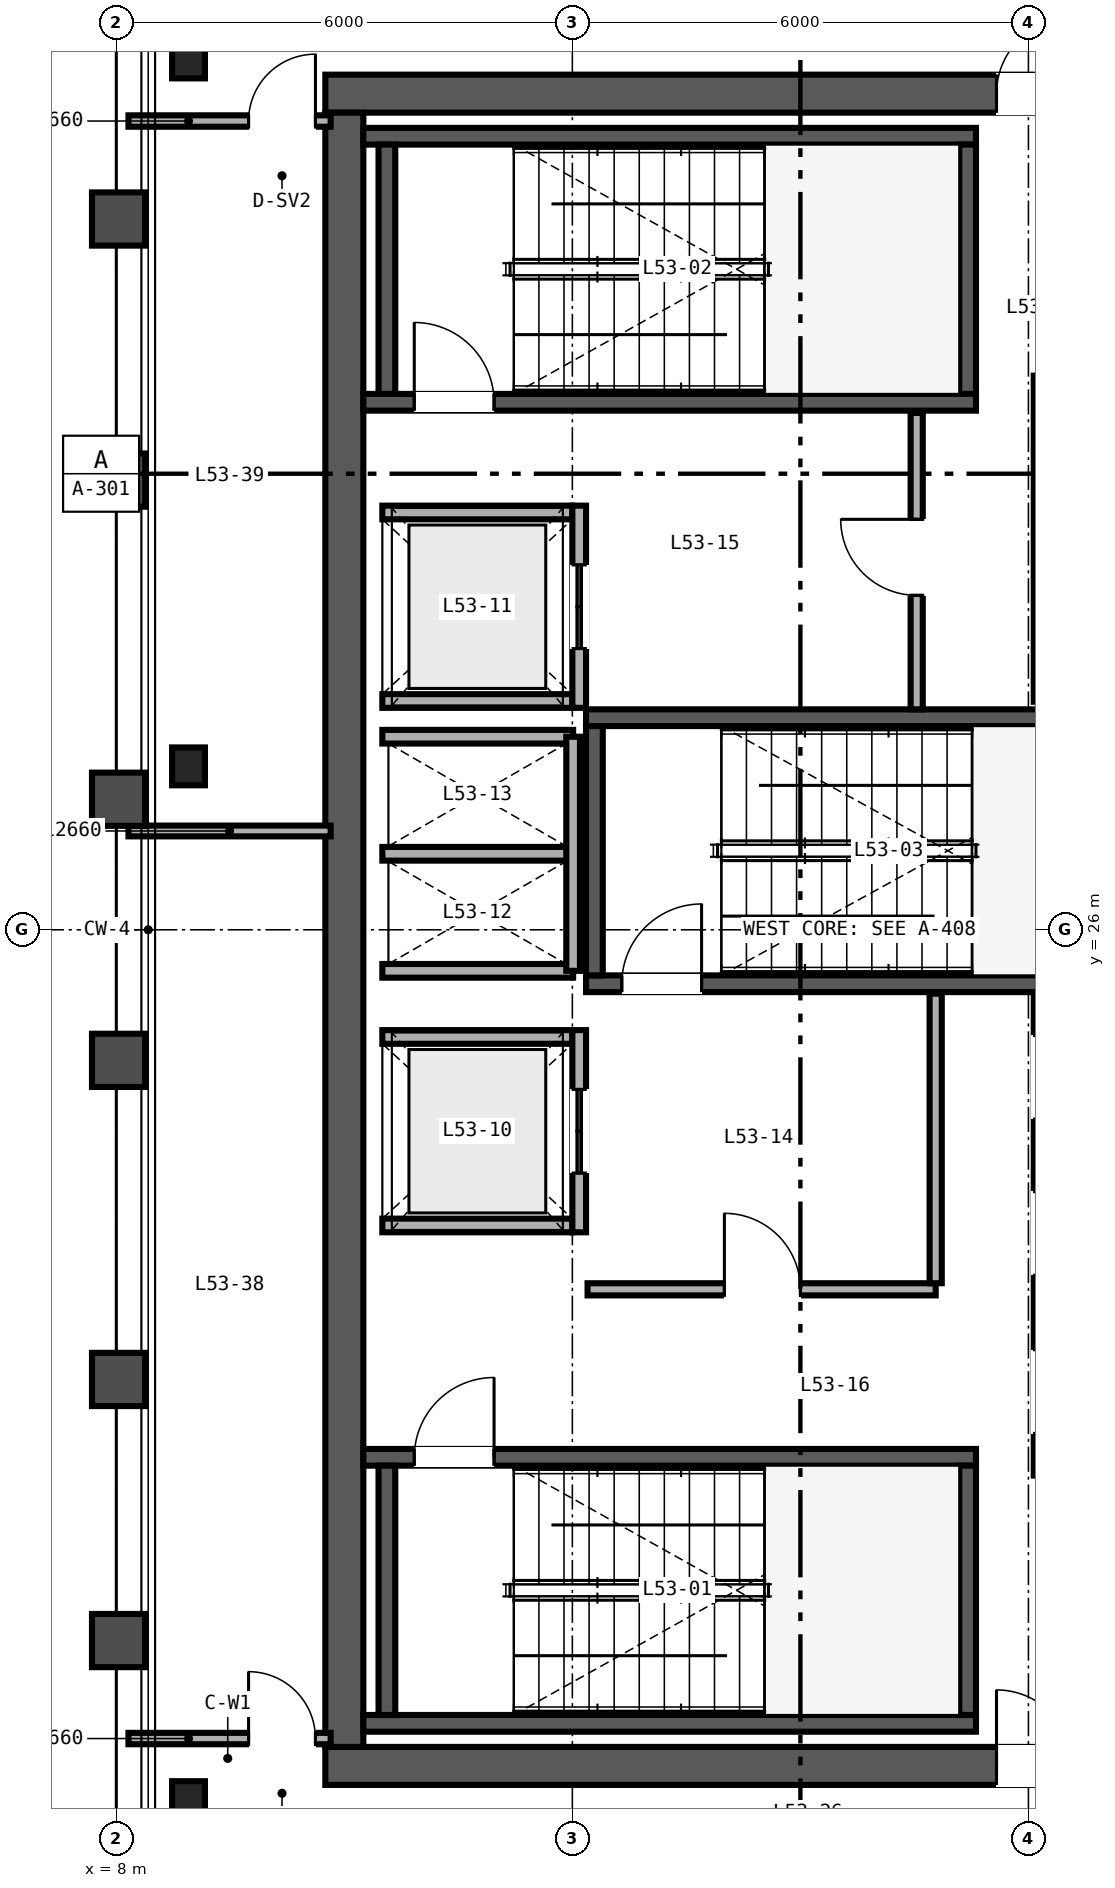
"""IFC4 building model, lengths in metres.
Left out: names, types, materials, properties, quantities, classifications, styles, units other than length and angle.
Written with IfcOpenShell. Run it as: python <this file> out.ifc"""

import sys

from ifc_helpers import new_model, si_unit, direction, frame, frame_2d, origin, origin_2d, place, context, subcontext, project, spatial, rectangle, i_section, extrude, source, transform, mapped, element, fill, save


model = new_model("IFC4")
c1 = context("Model", 3, precision=1e-05, world=origin(), true_north=direction((0.0, 1.0)))
c2 = subcontext(c1, "Body", "Model", "MODEL_VIEW")
j1 = project(units=[si_unit("LENGTHUNIT", "METRE"), si_unit("PLANEANGLEUNIT", "RADIAN")], contexts=[c1])
p1 = place(None, origin())
s1 = spatial("IfcSite", under=j1, at=p1, CompositionType="ELEMENT")
p2 = place(p1, origin())
s2 = spatial("IfcBuilding", under=s1, at=p2, CompositionType="ELEMENT")
p3 = place(p2, frame((0.0, 0.0, 210.0)))
s3 = spatial("IfcBuildingStorey", under=s2, at=p3, CompositionType="ELEMENT", Elevation=210.0)
p4 = place(p3, frame((10.75, 15.0, 0.0), z_axis=(0.0, 0.0, 1.0), x_axis=(1.0, 0.0, 0.0)))
e1 = element("IfcWall", 1, at=p4, inside=s3, PredefinedType="SHEAR", context=c2, shape_type="SweptSolid", body=[
    extrude(rectangle(XDim=12.5, YDim=0.5, at=frame_2d((6.25, 0.0))), origin(), (0.0, 0.0, 1.0), 3.37),
])
p5 = place(p4, frame((8.83, 0.0, 0.0)))
e2 = element("IfcOpeningElement", 2, at=p5, cuts=e1, PredefinedType="OPENING", context=c2, shape_type="SweptSolid", body=[
    extrude(rectangle(XDim=1.0, YDim=2.15, at=frame_2d((0.5, 1.075))), frame((0.0, 0.26, 0.0), z_axis=(0.0, -1.0, 0.0), x_axis=(1.0, 0.0, 0.0)), (0.0, 0.0, 1.0), 0.52),
])
p6 = place(p3, frame((10.75, 37.0, 0.0), z_axis=(0.0, 0.0, 1.0), x_axis=(1.0, 0.0, 0.0)))
e3 = element("IfcWall", 3, at=p6, inside=s3, PredefinedType="SHEAR", context=c2, shape_type="SweptSolid", body=[
    extrude(rectangle(XDim=12.5, YDim=0.5, at=frame_2d((6.25, 0.0))), origin(), (0.0, 0.0, 1.0), 3.37),
])
p7 = place(p6, frame((8.83, 0.0, 0.0)))
e4 = element("IfcOpeningElement", 4, at=p7, cuts=e3, PredefinedType="OPENING", context=c2, shape_type="SweptSolid", body=[
    extrude(rectangle(XDim=1.0, YDim=2.15, at=frame_2d((0.5, 1.075))), frame((0.0, 0.26, 0.0), z_axis=(0.0, -1.0, 0.0), x_axis=(1.0, 0.0, 0.0)), (0.0, 0.0, 1.0), 0.52),
])
p8 = place(p3, frame((11.0, 15.25, 0.0), z_axis=(0.0, 0.0, 1.0), x_axis=(0.0, 1.0, 0.0)))
e5 = element("IfcWall", 5, at=p8, inside=s3, PredefinedType="SHEAR", context=c2, shape_type="SweptSolid", body=[
    extrude(rectangle(XDim=21.5, YDim=0.5, at=frame_2d((10.75, 0.0))), origin(), (0.0, 0.0, 1.0), 3.37),
])
p9 = place(p3, frame((11.25, 15.56, 0.0), z_axis=(0.0, 0.0, 1.0), x_axis=(1.0, 0.0, 0.0)))
e6 = element("IfcWall", 6, at=p9, inside=s3, PredefinedType="SHEAR", context=c2, shape_type="SweptSolid", body=[
    extrude(rectangle(XDim=8.06, YDim=0.22, at=frame_2d((4.03, 0.0))), origin(), (0.0, 0.0, 1.0), 3.4),
])
p10 = place(p3, frame((11.25, 19.06, 0.0), z_axis=(0.0, 0.0, 1.0), x_axis=(1.0, 0.0, 0.0)))
e7 = element("IfcWall", 7, at=p10, inside=s3, PredefinedType="SHEAR", context=c2, shape_type="SweptSolid", body=[
    extrude(rectangle(XDim=8.06, YDim=0.22, at=frame_2d((4.03, 0.0))), origin(), (0.0, 0.0, 1.0), 3.4),
])
p11 = place(p10, frame((0.67, 0.0, 0.0)))
e8 = element("IfcOpeningElement", 8, at=p11, cuts=e7, PredefinedType="OPENING", context=c2, shape_type="SweptSolid", body=[
    extrude(rectangle(XDim=1.05, YDim=2.15, at=frame_2d((0.525, 1.075))), frame((0.0, 0.12, 0.0), z_axis=(0.0, -1.0, 0.0), x_axis=(1.0, 0.0, 0.0)), (0.0, 0.0, 1.0), 0.24),
])
for number, where, z_axis, x_axis in (
    (9, (11.56, 15.67, 0.0), (0.0, 0.0, 1.0), (0.0, 1.0, 0.0)),
    (10, (19.2, 15.67, 0.0), (0.0, 0.0, 1.0), (0.0, 1.0, 0.0)),
):
    element("IfcWall", number, at=place(p3, frame(where, z_axis=z_axis, x_axis=x_axis)), inside=s3, PredefinedType="SHEAR", context=c2, shape_type="SweptSolid", body=[
        extrude(rectangle(XDim=3.28, YDim=0.22, at=frame_2d((1.64, 0.0))), origin(), (0.0, 0.0, 1.0), 3.4),
    ])
p12 = place(p3, frame((11.25, 32.94, 0.0), z_axis=(0.0, 0.0, 1.0), x_axis=(1.0, 0.0, 0.0)))
e11 = element("IfcWall", 11, at=p12, inside=s3, PredefinedType="SHEAR", context=c2, shape_type="SweptSolid", body=[
    extrude(rectangle(XDim=8.06, YDim=0.22, at=frame_2d((4.03, 0.0))), origin(), (0.0, 0.0, 1.0), 3.4),
])
p13 = place(p12, frame((0.67, 0.0, 0.0)))
e12 = element("IfcOpeningElement", 12, at=p13, cuts=e11, PredefinedType="OPENING", context=c2, shape_type="SweptSolid", body=[
    extrude(rectangle(XDim=1.05, YDim=2.15, at=frame_2d((0.525, 1.075))), frame((0.0, 0.12, 0.0), z_axis=(0.0, -1.0, 0.0), x_axis=(1.0, 0.0, 0.0)), (0.0, 0.0, 1.0), 0.24),
])
p14 = place(p3, frame((11.25, 36.44, 0.0), z_axis=(0.0, 0.0, 1.0), x_axis=(1.0, 0.0, 0.0)))
e13 = element("IfcWall", 13, at=p14, inside=s3, PredefinedType="SHEAR", context=c2, shape_type="SweptSolid", body=[
    extrude(rectangle(XDim=8.06, YDim=0.22, at=frame_2d((4.03, 0.0))), origin(), (0.0, 0.0, 1.0), 3.4),
])
for number, where, z_axis, x_axis in (
    (14, (11.56, 33.05, 0.0), (0.0, 0.0, 1.0), (0.0, 1.0, 0.0)),
    (15, (19.2, 33.05, 0.0), (0.0, 0.0, 1.0), (0.0, 1.0, 0.0)),
):
    element("IfcWall", number, at=place(p3, frame(where, z_axis=z_axis, x_axis=x_axis)), inside=s3, PredefinedType="SHEAR", context=c2, shape_type="SweptSolid", body=[
        extrude(rectangle(XDim=3.28, YDim=0.22, at=frame_2d((1.64, 0.0))), origin(), (0.0, 0.0, 1.0), 3.4),
    ])
p15 = place(p3, frame((14.18, 25.29, 0.0), z_axis=(0.0, 0.0, 1.0), x_axis=(1.0, 0.0, 0.0)))
e16 = element("IfcWall", 16, at=p15, inside=s3, PredefinedType="SHEAR", context=c2, shape_type="SweptSolid", body=[
    extrude(rectangle(XDim=8.57, YDim=0.22, at=frame_2d((4.285, 0.0))), origin(), (0.0, 0.0, 1.0), 3.4),
])
p16 = place(p15, frame((0.47, 0.0, 0.0)))
e17 = element("IfcOpeningElement", 17, at=p16, cuts=e16, PredefinedType="OPENING", context=c2, shape_type="SweptSolid", body=[
    extrude(rectangle(XDim=1.05, YDim=2.15, at=frame_2d((0.525, 1.075))), frame((0.0, 0.12, 0.0), z_axis=(0.0, -1.0, 0.0), x_axis=(1.0, 0.0, 0.0)), (0.0, 0.0, 1.0), 0.24),
])
p17 = place(p3, frame((14.18, 28.79, 0.0), z_axis=(0.0, 0.0, 1.0), x_axis=(1.0, 0.0, 0.0)))
e18 = element("IfcWall", 18, at=p17, inside=s3, PredefinedType="SHEAR", context=c2, shape_type="SweptSolid", body=[
    extrude(rectangle(XDim=8.57, YDim=0.22, at=frame_2d((4.285, 0.0))), origin(), (0.0, 0.0, 1.0), 3.4),
])
p18 = place(p3, frame((14.29, 25.4, 0.0), z_axis=(0.0, 0.0, 1.0), x_axis=(0.0, 1.0, 0.0)))
e19 = element("IfcWall", 19, at=p18, inside=s3, PredefinedType="SHEAR", context=c2, shape_type="SweptSolid", body=[
    extrude(rectangle(XDim=3.28, YDim=0.22, at=frame_2d((1.64, 0.0))), origin(), (0.0, 0.0, 1.0), 3.4),
])
m1 = source(origin(), c2, "Body", "SweptSolid", [
    extrude(i_section(OverallWidth=0.432, OverallDepth=0.498, WebThickness=0.056, FlangeThickness=0.089, FilletRadius=0.025, at=origin_2d()), origin(), (0.0, 0.0, 1.0), 3.37),
])
for number, where, z_axis, x_axis in (
    (20, (8.95, 14.55, 0.0), (0.0, 0.0, 1.0), (1.0, 0.0, 0.0)),
    (21, (8.95, 28.15, 0.0), (0.0, 0.0, 1.0), (1.0, 0.0, 0.0)),
    (22, (8.95, 37.45, 0.0), (0.0, 0.0, 1.0), (1.0, 0.0, 0.0)),
):
    element("IfcColumn", number, at=place(p3, frame(where, z_axis=z_axis, x_axis=x_axis)), inside=s3, PredefinedType="COLUMN", context=c2, shape_type="MappedRepresentation", body=[
        mapped(m1, transform((0.0, 0.0, 0.0), scale=1.0)),
    ])
p19 = place(p3, frame((20.16, 18.82, 0.0), z_axis=(0.0, 0.0, 1.0), x_axis=(0.0, 1.0, 0.0)))
e23 = element("IfcWall", 23, at=p19, inside=s3, PredefinedType="SOLIDWALL", context=c2, shape_type="SweptSolid", body=[
    extrude(rectangle(XDim=6.32, YDim=0.18, at=frame_2d((3.16, 0.0))), origin(), (0.0, 0.0, 1.0), 2.47),
])
p20 = place(p19, frame((0.555, 0.0, 0.0)))
e24 = element("IfcOpeningElement", 24, at=p20, cuts=e23, PredefinedType="OPENING", context=c2, shape_type="SweptSolid", body=[
    extrude(rectangle(XDim=1.1, YDim=2.2, at=frame_2d((0.55, 1.1))), frame((0.0, 0.1, 0.0), z_axis=(0.0, -1.0, 0.0), x_axis=(1.0, 0.0, 0.0)), (0.0, 0.0, 1.0), 0.2),
])
p21 = place(p19, frame((2.635, 0.0, 0.0)))
e25 = element("IfcOpeningElement", 25, at=p21, cuts=e23, PredefinedType="OPENING", context=c2, shape_type="SweptSolid", body=[
    extrude(rectangle(XDim=1.1, YDim=2.2, at=frame_2d((0.55, 1.1))), frame((0.0, 0.1, 0.0), z_axis=(0.0, -1.0, 0.0), x_axis=(1.0, 0.0, 0.0)), (0.0, 0.0, 1.0), 0.2),
])
p22 = place(p19, frame((4.69, 0.0, 0.0)))
e26 = element("IfcOpeningElement", 26, at=p22, cuts=e23, PredefinedType="OPENING", context=c2, shape_type="SweptSolid", body=[
    extrude(rectangle(XDim=1.1, YDim=2.2, at=frame_2d((0.55, 1.1))), frame((0.0, 0.1, 0.0), z_axis=(0.0, -1.0, 0.0), x_axis=(1.0, 0.0, 0.0)), (0.0, 0.0, 1.0), 0.2),
])
p23 = place(p3, frame((20.16, 29.0, 0.0), z_axis=(0.0, 0.0, 1.0), x_axis=(0.0, 1.0, 0.0)))
e27 = element("IfcWall", 27, at=p23, inside=s3, PredefinedType="SOLIDWALL", context=c2, shape_type="SweptSolid", body=[
    extrude(rectangle(XDim=4.29, YDim=0.18, at=frame_2d((2.145, 0.0))), origin(), (0.0, 0.0, 1.0), 3.37),
])
for number, where, z_axis, x_axis in (
    (28, (11.5, 22.11, 0.0), (0.0, 0.0, 1.0), (1.0, 0.0, 0.0)),
    (29, (11.5, 24.59, 0.0), (0.0, 0.0, 1.0), (1.0, 0.0, 0.0)),
):
    element("IfcWall", number, at=place(p3, frame(where, z_axis=z_axis, x_axis=x_axis)), inside=s3, PredefinedType="SOLIDWALL", context=c2, shape_type="SweptSolid", body=[
        extrude(rectangle(XDim=2.5, YDim=0.18, at=frame_2d((1.25, 0.0))), origin(), (0.0, 0.0, 1.0), 3.37),
    ])
p24 = place(p3, frame((14.09, 22.02, 0.0), z_axis=(0.0, 0.0, 1.0), x_axis=(0.0, 1.0, 0.0)))
e30 = element("IfcWall", 30, at=p24, inside=s3, PredefinedType="SOLIDWALL", context=c2, shape_type="SweptSolid", body=[
    extrude(rectangle(XDim=2.66, YDim=0.18, at=frame_2d((1.33, 0.0))), origin(), (0.0, 0.0, 1.0), 3.37),
])
p25 = place(p24, frame((0.78, 0.0, 0.0)))
e31 = element("IfcOpeningElement", 31, at=p25, cuts=e30, PredefinedType="OPENING", context=c2, shape_type="SweptSolid", body=[
    extrude(rectangle(XDim=1.1, YDim=2.2, at=frame_2d((0.55, 1.1))), frame((0.0, 0.1, 0.0), z_axis=(0.0, -1.0, 0.0), x_axis=(1.0, 0.0, 0.0)), (0.0, 0.0, 1.0), 0.2),
])
for number, where, z_axis, x_axis in (
    (32, (11.5, 29.01, 0.0), (0.0, 0.0, 1.0), (1.0, 0.0, 0.0)),
    (33, (11.5, 31.49, 0.0), (0.0, 0.0, 1.0), (1.0, 0.0, 0.0)),
):
    element("IfcWall", number, at=place(p3, frame(where, z_axis=z_axis, x_axis=x_axis)), inside=s3, PredefinedType="SOLIDWALL", context=c2, shape_type="SweptSolid", body=[
        extrude(rectangle(XDim=2.5, YDim=0.18, at=frame_2d((1.25, 0.0))), origin(), (0.0, 0.0, 1.0), 3.37),
    ])
p26 = place(p3, frame((14.09, 28.92, 0.0), z_axis=(0.0, 0.0, 1.0), x_axis=(0.0, 1.0, 0.0)))
e34 = element("IfcWall", 34, at=p26, inside=s3, PredefinedType="SOLIDWALL", context=c2, shape_type="SweptSolid", body=[
    extrude(rectangle(XDim=2.66, YDim=0.18, at=frame_2d((1.33, 0.0))), origin(), (0.0, 0.0, 1.0), 3.37),
])
p27 = place(p26, frame((0.78, 0.0, 0.0)))
e35 = element("IfcOpeningElement", 35, at=p27, cuts=e34, PredefinedType="OPENING", context=c2, shape_type="SweptSolid", body=[
    extrude(rectangle(XDim=1.1, YDim=2.2, at=frame_2d((0.55, 1.1))), frame((0.0, 0.1, 0.0), z_axis=(0.0, -1.0, 0.0), x_axis=(1.0, 0.0, 0.0)), (0.0, 0.0, 1.0), 0.2),
])
for number, where, z_axis, x_axis in (
    (36, (11.5, 25.46, 0.0), (0.0, 0.0, 1.0), (1.0, 0.0, 0.0)),
    (37, (11.5, 27.0, 0.0), (0.0, 0.0, 1.0), (1.0, 0.0, 0.0)),
    (38, (11.5, 28.54, 0.0), (0.0, 0.0, 1.0), (1.0, 0.0, 0.0)),
):
    element("IfcWall", number, at=place(p3, frame(where, z_axis=z_axis, x_axis=x_axis)), inside=s3, PredefinedType="SOLIDWALL", context=c2, shape_type="SweptSolid", body=[
        extrude(rectangle(XDim=2.51, YDim=0.18, at=frame_2d((1.255, 0.0))), origin(), (0.0, 0.0, 1.0), 3.37),
    ])
p28 = place(p3, frame((14.01, 25.46, 0.0), z_axis=(0.0, 0.0, 1.0), x_axis=(0.0, 1.0, 0.0)))
e39 = element("IfcWall", 39, at=p28, inside=s3, PredefinedType="SOLIDWALL", context=c2, shape_type="SweptSolid", body=[
    extrude(rectangle(XDim=3.08, YDim=0.18, at=frame_2d((1.54, 0.0))), origin(), (0.0, 0.0, 1.0), 3.37),
])
p29 = place(p3, frame((14.2, 21.27, 0.0), z_axis=(0.0, 0.0, 1.0), x_axis=(1.0, 0.0, 0.0)))
e40 = element("IfcWall", 40, at=p29, inside=s3, PredefinedType="PARTITIONING", context=c2, shape_type="SweptSolid", body=[
    extrude(rectangle(XDim=4.58, YDim=0.16, at=frame_2d((2.29, 0.0))), origin(), (0.0, 0.0, 1.0), 3.37),
])
p30 = place(p29, frame((1.8, 0.0, 0.0)))
e41 = element("IfcOpeningElement", 41, at=p30, cuts=e40, PredefinedType="OPENING", context=c2, shape_type="SweptSolid", body=[
    extrude(rectangle(XDim=1.0, YDim=2.15, at=frame_2d((0.5, 1.075))), frame((0.0, 0.09, 0.0), z_axis=(0.0, -1.0, 0.0), x_axis=(1.0, 0.0, 0.0)), (0.0, 0.0, 1.0), 0.18),
])
p31 = place(p3, frame((18.78, 21.35, 0.0), z_axis=(0.0, 0.0, 1.0), x_axis=(0.0, 1.0, 0.0)))
e42 = element("IfcWall", 42, at=p31, inside=s3, PredefinedType="PARTITIONING", context=c2, shape_type="SweptSolid", body=[
    extrude(rectangle(XDim=3.81, YDim=0.16, at=frame_2d((1.905, 0.0))), origin(), (0.0, 0.0, 1.0), 3.37),
])
p32 = place(p3, frame((18.53, 28.9, 0.0), z_axis=(0.0, 0.0, 1.0), x_axis=(0.0, 1.0, 0.0)))
e43 = element("IfcWall", 43, at=p32, inside=s3, PredefinedType="PARTITIONING", context=c2, shape_type="SweptSolid", body=[
    extrude(rectangle(XDim=3.9, YDim=0.16, at=frame_2d((1.95, 0.0))), origin(), (0.0, 0.0, 1.0), 3.37),
])
p33 = place(p32, frame((1.5, 0.0, 0.0)))
e44 = element("IfcOpeningElement", 44, at=p33, cuts=e43, PredefinedType="OPENING", context=c2, shape_type="SweptSolid", body=[
    extrude(rectangle(XDim=1.0, YDim=2.15, at=frame_2d((0.5, 1.075))), frame((0.0, 0.09, 0.0), z_axis=(0.0, -1.0, 0.0), x_axis=(1.0, 0.0, 0.0)), (0.0, 0.0, 1.0), 0.18),
])
p34 = place(p3, frame((8.16, 15.36, 0.0), z_axis=(0.0, 0.0, 1.0), x_axis=(1.0, 0.0, 0.0)))
e45 = element("IfcWall", 45, at=p34, inside=s3, PredefinedType="PARTITIONING", context=c2, shape_type="SweptSolid", body=[
    extrude(rectangle(XDim=2.66, YDim=0.15, at=frame_2d((1.33, 0.0))), origin(), (0.0, 0.0, 1.0), 2.591),
])
p35 = place(p34, frame((1.58, 0.0, 0.0)))
e46 = element("IfcOpeningElement", 46, at=p35, cuts=e45, PredefinedType="OPENING", context=c2, shape_type="SweptSolid", body=[
    extrude(rectangle(XDim=0.88, YDim=2.15, at=frame_2d((0.44, 1.075))), frame((0.0, 0.085, 0.0), z_axis=(0.0, -1.0, 0.0), x_axis=(1.0, 0.0, 0.0)), (0.0, 0.0, 1.0), 0.17),
])
p36 = place(p3, frame((8.16, 36.64, 0.0), z_axis=(0.0, 0.0, 1.0), x_axis=(1.0, 0.0, 0.0)))
e47 = element("IfcWall", 47, at=p36, inside=s3, PredefinedType="PARTITIONING", context=c2, shape_type="SweptSolid", body=[
    extrude(rectangle(XDim=2.66, YDim=0.15, at=frame_2d((1.33, 0.0))), origin(), (0.0, 0.0, 1.0), 2.753),
])
p37 = place(p36, frame((1.58, 0.0, 0.0)))
e48 = element("IfcOpeningElement", 48, at=p37, cuts=e47, PredefinedType="OPENING", context=c2, shape_type="SweptSolid", body=[
    extrude(rectangle(XDim=0.88, YDim=2.15, at=frame_2d((0.44, 1.075))), frame((0.0, 0.085, 0.0), z_axis=(0.0, -1.0, 0.0), x_axis=(1.0, 0.0, 0.0)), (0.0, 0.0, 1.0), 0.17),
])
p38 = place(p3, frame((8.16, 27.3, 0.0), z_axis=(0.0, 0.0, 1.0), x_axis=(1.0, 0.0, 0.0)))
e49 = element("IfcWall", 49, at=p38, inside=s3, PredefinedType="PARTITIONING", context=c2, shape_type="SweptSolid", body=[
    extrude(rectangle(XDim=2.66, YDim=0.142, at=frame_2d((1.33, 0.0))), origin(), (0.0, 0.0, 1.0), 2.591),
])
m2 = source(origin(), c2, "Body", "SweptSolid", [
    extrude(rectangle(XDim=1.05, YDim=2.15, at=frame_2d((0.525, 1.075))), frame((0.0, 0.025, 0.0), z_axis=(0.0, -1.0, 0.0), x_axis=(1.0, 0.0, 0.0)), (0.0, 0.0, 1.0), 0.05),
])
p39 = place(p11, origin())
e50 = element("IfcDoor", 50, at=p39, inside=s3, OperationType="SINGLE_SWING_RIGHT", PredefinedType="DOOR", context=c2, shape_type="MappedRepresentation", body=[
    mapped(m2, transform((0.0, 0.0, 0.0), scale=1.0)),
])
fill(e8, e50)
p40 = place(p13, origin())
e51 = element("IfcDoor", 51, at=p40, inside=s3, OperationType="SINGLE_SWING_LEFT", PredefinedType="DOOR", context=c2, shape_type="MappedRepresentation", body=[
    mapped(m2, transform((0.0, 0.0, 0.0), scale=1.0)),
])
fill(e12, e51)
p41 = place(p16, origin())
e52 = element("IfcDoor", 52, at=p41, inside=s3, OperationType="SINGLE_SWING_RIGHT", PredefinedType="DOOR", context=c2, shape_type="MappedRepresentation", body=[
    mapped(m2, transform((0.0, 0.0, 0.0), scale=1.0)),
])
fill(e17, e52)
m3 = source(origin(), c2, "Body", "SweptSolid", [
    extrude(rectangle(XDim=1.1, YDim=2.2, at=frame_2d((0.55, 1.1))), frame((0.0, 0.025, 0.0), z_axis=(0.0, -1.0, 0.0), x_axis=(1.0, 0.0, 0.0)), (0.0, 0.0, 1.0), 0.05),
])
p42 = place(p25, origin())
e53 = element("IfcDoor", 53, at=p42, inside=s3, OperationType="DOUBLE_DOOR_SLIDING", PredefinedType="DOOR", context=c2, shape_type="MappedRepresentation", body=[
    mapped(m3, transform((0.0, 0.0, 0.0), scale=1.0)),
])
fill(e31, e53)
p43 = place(p27, origin())
e54 = element("IfcDoor", 54, at=p43, inside=s3, OperationType="DOUBLE_DOOR_SLIDING", PredefinedType="DOOR", context=c2, shape_type="MappedRepresentation", body=[
    mapped(m3, transform((0.0, 0.0, 0.0), scale=1.0)),
])
fill(e35, e54)
m4 = source(origin(), c2, "Body", "SweptSolid", [
    extrude(rectangle(XDim=1.0, YDim=2.15, at=frame_2d((0.5, 1.075))), frame((0.0, 0.025, 0.0), z_axis=(0.0, -1.0, 0.0), x_axis=(1.0, 0.0, 0.0)), (0.0, 0.0, 1.0), 0.05),
])
p44 = place(p30, origin())
e55 = element("IfcDoor", 55, at=p44, inside=s3, OperationType="SINGLE_SWING_LEFT", PredefinedType="DOOR", context=c2, shape_type="MappedRepresentation", body=[
    mapped(m4, transform((0.0, 0.0, 0.0), scale=1.0)),
])
fill(e41, e55)
p45 = place(p33, origin())
e56 = element("IfcDoor", 56, at=p45, inside=s3, OperationType="SINGLE_SWING_RIGHT", PredefinedType="DOOR", context=c2, shape_type="MappedRepresentation", body=[
    mapped(m4, transform((0.0, 0.0, 0.0), scale=1.0)),
])
fill(e44, e56)
p46 = place(p5, origin())
e57 = element("IfcDoor", 57, at=p46, inside=s3, OperationType="SINGLE_SWING_LEFT", PredefinedType="DOOR", context=c2, shape_type="MappedRepresentation", body=[
    mapped(m4, transform((0.0, 0.0, 0.0), scale=1.0)),
])
fill(e2, e57)
p47 = place(p7, origin())
e58 = element("IfcDoor", 58, at=p47, inside=s3, OperationType="SINGLE_SWING_RIGHT", PredefinedType="DOOR", context=c2, shape_type="MappedRepresentation", body=[
    mapped(m4, transform((0.0, 0.0, 0.0), scale=1.0)),
])
fill(e4, e58)
m5 = source(origin(), c2, "Body", "SweptSolid", [
    extrude(rectangle(XDim=0.88, YDim=2.15, at=frame_2d((0.44, 1.075))), frame((0.0, 0.025, 0.0), z_axis=(0.0, -1.0, 0.0), x_axis=(1.0, 0.0, 0.0)), (0.0, 0.0, 1.0), 0.05),
])
p48 = place(p35, origin())
e59 = element("IfcDoor", 59, at=p48, inside=s3, OperationType="SINGLE_SWING_LEFT", PredefinedType="DOOR", context=c2, shape_type="MappedRepresentation", body=[
    mapped(m5, transform((0.0, 0.0, 0.0), scale=1.0)),
])
fill(e46, e59)
p49 = place(p37, origin())
e60 = element("IfcDoor", 60, at=p49, inside=s3, OperationType="SINGLE_SWING_RIGHT", PredefinedType="DOOR", context=c2, shape_type="MappedRepresentation", body=[
    mapped(m5, transform((0.0, 0.0, 0.0), scale=1.0)),
])
fill(e48, e60)
save(model, sys.argv[1])
